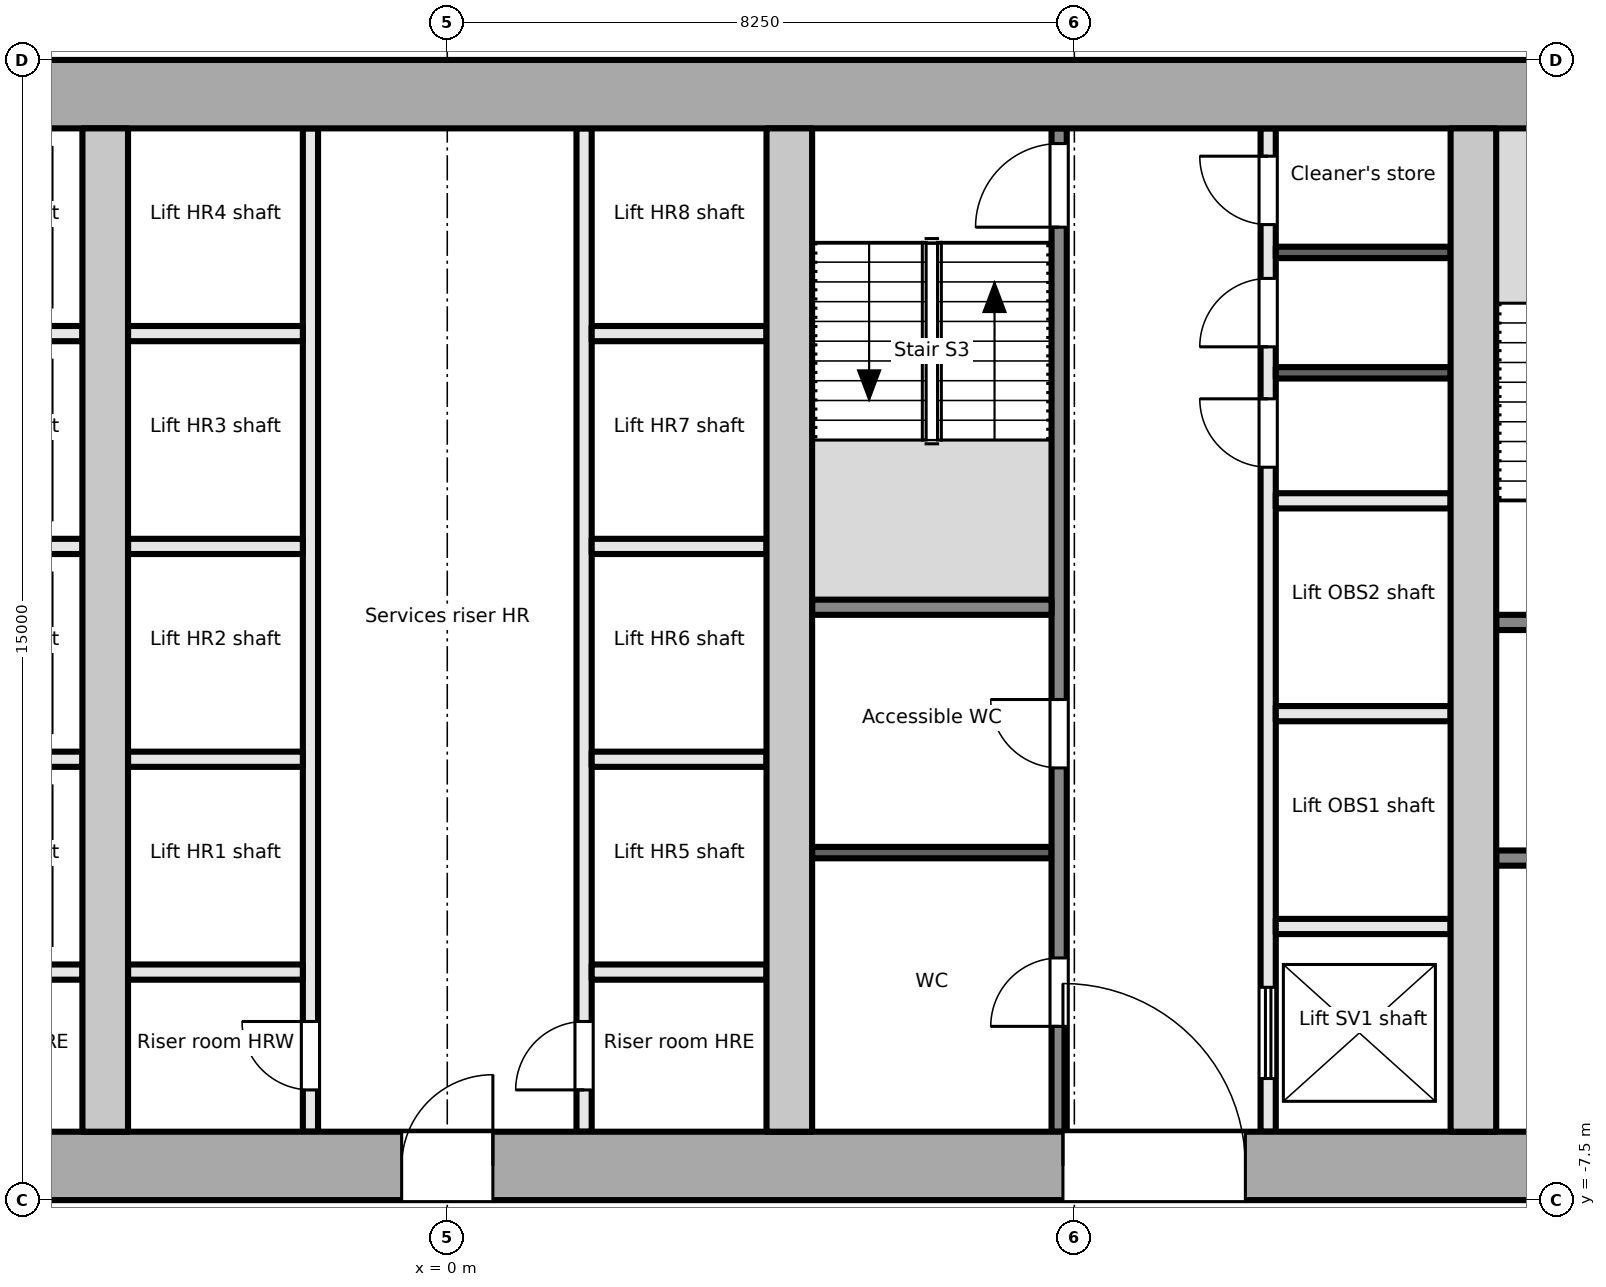
"""IFC4 building model, lengths in metres.
Left out: names, types, materials, properties, quantities, classifications, styles, units other than length and angle.
Written with IfcOpenShell. Run it as: python <this file> out.ifc"""

import sys

from ifc_helpers import new_model, si_unit, direction, frame, frame_2d, origin, place, context, subcontext, project, spatial, rectangle, extrude, element, fill, save


model = new_model("IFC4")
c1 = context("Model", 3, precision=1e-05, world=origin(), true_north=direction((0.0, 1.0)))
c2 = subcontext(c1, "Body", "Model", "MODEL_VIEW")
j1 = project(units=[si_unit("LENGTHUNIT", "METRE"), si_unit("PLANEANGLEUNIT", "RADIAN")], contexts=[c1])
p1 = place(None, origin())
s1 = spatial("IfcSite", under=j1, at=p1, CompositionType="ELEMENT")
p2 = place(p1, origin())
s2 = spatial("IfcBuilding", under=s1, at=p2, CompositionType="ELEMENT")
p3 = place(p2, frame((0.0, 0.0, 32.4)))
s3 = spatial("IfcBuildingStorey", under=s2, at=p3, CompositionType="ELEMENT", Elevation=32.4)
p4 = place(p3, frame((-18.0, -7.05, -0.2), z_axis=(0.0, 0.0, 1.0), x_axis=(1.0, 0.0, 0.0)))
e1 = element("IfcWall", 1, at=p4, inside=s3, PredefinedType="SHEAR", context=c2, shape_type="SweptSolid", body=[
    extrude(rectangle(XDim=36.0, YDim=0.9, at=frame_2d((18.0, 0.0))), origin(), (0.0, 0.0, 1.0), 4.1),
])
p5 = place(p4, frame((7.8, 0.0, 0.2)))
e2 = element("IfcOpeningElement", 2, at=p5, cuts=e1, PredefinedType="OPENING", context=c2, shape_type="SweptSolid", body=[
    extrude(rectangle(XDim=2.4, YDim=2.1, at=frame_2d((1.2, 1.05))), frame((0.0, 0.46, 0.0), z_axis=(0.0, -1.0, 0.0), x_axis=(1.0, 0.0, 0.0)), (0.0, 0.0, 1.0), 0.921),
])
p6 = place(p4, frame((17.4, 0.0, 0.2)))
e3 = element("IfcOpeningElement", 3, at=p6, cuts=e1, PredefinedType="OPENING", context=c2, shape_type="SweptSolid", body=[
    extrude(rectangle(XDim=1.2, YDim=2.1, at=frame_2d((0.6, 1.05))), frame((0.0, 0.46, 0.0), z_axis=(0.0, -1.0, 0.0), x_axis=(1.0, 0.0, 0.0)), (0.0, 0.0, 1.0), 0.921),
])
p7 = place(p4, frame((26.1, 0.0, 0.2)))
e4 = element("IfcOpeningElement", 4, at=p7, cuts=e1, PredefinedType="OPENING", context=c2, shape_type="SweptSolid", body=[
    extrude(rectangle(XDim=2.4, YDim=2.1, at=frame_2d((1.2, 1.05))), frame((0.0, 0.46, 0.0), z_axis=(0.0, -1.0, 0.0), x_axis=(1.0, 0.0, 0.0)), (0.0, 0.0, 1.0), 0.921),
])
p8 = place(p3, frame((-18.0, 7.05, -0.2), z_axis=(0.0, 0.0, 1.0), x_axis=(1.0, 0.0, 0.0)))
e5 = element("IfcWall", 5, at=p8, inside=s3, PredefinedType="SHEAR", context=c2, shape_type="SweptSolid", body=[
    extrude(rectangle(XDim=36.0, YDim=0.9, at=frame_2d((18.0, 0.0))), origin(), (0.0, 0.0, 1.0), 4.1),
])
for number, where, z_axis, x_axis in (
    (6, (-4.5, -6.6, -0.2), (0.0, 0.0, 1.0), (0.0, 1.0, 0.0)),
    (7, (4.5, -6.6, -0.2), (0.0, 0.0, 1.0), (0.0, 1.0, 0.0)),
    (8, (13.5, -6.6, -0.2), (0.0, 0.0, 1.0), (0.0, 1.0, 0.0)),
):
    element("IfcWall", number, at=place(p3, frame(where, z_axis=z_axis, x_axis=x_axis)), inside=s3, PredefinedType="SHEAR", context=c2, shape_type="SweptSolid", body=[
        extrude(rectangle(XDim=13.2, YDim=0.6, at=frame_2d((6.6, 0.0))), origin(), (0.0, 0.0, 1.0), 4.1),
    ])
p9 = place(p3, frame((13.8, -3.0, 0.0), z_axis=(0.0, 0.0, 1.0), x_axis=(1.0, 0.0, 0.0)))
e9 = element("IfcWall", 9, at=p9, inside=s3, PredefinedType="PARTITIONING", context=c2, shape_type="SweptSolid", body=[
    extrude(rectangle(XDim=3.3, YDim=0.2, at=frame_2d((1.65, 0.0))), origin(), (0.0, 0.0, 1.0), 3.9),
])
p10 = place(p9, frame((1.1, 0.0, 0.0)))
e10 = element("IfcOpeningElement", 10, at=p10, cuts=e9, PredefinedType="OPENING", context=c2, shape_type="SweptSolid", body=[
    extrude(rectangle(XDim=1.1, YDim=2.1, at=frame_2d((0.55, 1.05))), frame((0.0, 0.111, 0.0), z_axis=(0.0, -1.0, 0.0), x_axis=(1.0, 0.0, 0.0)), (0.0, 0.0, 1.0), 0.221),
])
p11 = place(p3, frame((13.8, 0.1, 0.0), z_axis=(0.0, 0.0, 1.0), x_axis=(1.0, 0.0, 0.0)))
e11 = element("IfcWall", 11, at=p11, inside=s3, PredefinedType="PARTITIONING", context=c2, shape_type="SweptSolid", body=[
    extrude(rectangle(XDim=3.3, YDim=0.2, at=frame_2d((1.65, 0.0))), origin(), (0.0, 0.0, 1.0), 3.9),
])
p12 = place(p11, frame((1.1, 0.0, 0.0)))
e12 = element("IfcOpeningElement", 12, at=p12, cuts=e11, PredefinedType="OPENING", context=c2, shape_type="SweptSolid", body=[
    extrude(rectangle(XDim=1.1, YDim=2.1, at=frame_2d((0.55, 1.05))), frame((0.0, 0.111, 0.0), z_axis=(0.0, -1.0, 0.0), x_axis=(1.0, 0.0, 0.0)), (0.0, 0.0, 1.0), 0.221),
])
for number, where, z_axis, x_axis in (
    (13, (-7.1, -1.7, 0.0), (0.0, 0.0, 1.0), (1.0, 0.0, 0.0)),
    (14, (-7.1, 1.1, 0.0), (0.0, 0.0, 1.0), (1.0, 0.0, 0.0)),
    (15, (-7.1, 3.9, 0.0), (0.0, 0.0, 1.0), (1.0, 0.0, 0.0)),
    (16, (-7.1, -4.5, 0.0), (0.0, 0.0, 1.0), (1.0, 0.0, 0.0)),
):
    element("IfcWall", number, at=place(p3, frame(where, z_axis=z_axis, x_axis=x_axis)), inside=s3, PredefinedType="PARTITIONING", context=c2, shape_type="SweptSolid", body=[
        extrude(rectangle(XDim=2.3, YDim=0.2, at=frame_2d((1.15, 0.0))), origin(), (0.0, 0.0, 1.0), 3.9),
    ])
p13 = place(p3, frame((-1.8, -6.6, 0.0), z_axis=(0.0, 0.0, 1.0), x_axis=(0.0, 1.0, 0.0)))
e17 = element("IfcWall", 17, at=p13, inside=s3, PredefinedType="PARTITIONING", context=c2, shape_type="SweptSolid", body=[
    extrude(rectangle(XDim=13.2, YDim=0.2, at=frame_2d((6.6, 0.0))), origin(), (0.0, 0.0, 1.0), 3.9),
])
p14 = place(p13, frame((0.55, 0.0, 0.0)))
e18 = element("IfcOpeningElement", 18, at=p14, cuts=e17, PredefinedType="OPENING", context=c2, shape_type="SweptSolid", body=[
    extrude(rectangle(XDim=0.9, YDim=2.1, at=frame_2d((0.45, 1.05))), frame((0.0, 0.111, 0.0), z_axis=(0.0, -1.0, 0.0), x_axis=(1.0, 0.0, 0.0)), (0.0, 0.0, 1.0), 0.221),
])
p15 = place(p3, frame((1.8, -6.6, 0.0), z_axis=(0.0, 0.0, 1.0), x_axis=(0.0, 1.0, 0.0)))
e19 = element("IfcWall", 19, at=p15, inside=s3, PredefinedType="PARTITIONING", context=c2, shape_type="SweptSolid", body=[
    extrude(rectangle(XDim=13.2, YDim=0.2, at=frame_2d((6.6, 0.0))), origin(), (0.0, 0.0, 1.0), 3.9),
])
p16 = place(p15, frame((0.55, 0.0, 0.0)))
e20 = element("IfcOpeningElement", 20, at=p16, cuts=e19, PredefinedType="OPENING", context=c2, shape_type="SweptSolid", body=[
    extrude(rectangle(XDim=0.9, YDim=2.1, at=frame_2d((0.45, 1.05))), frame((0.0, 0.111, 0.0), z_axis=(0.0, -1.0, 0.0), x_axis=(1.0, 0.0, 0.0)), (0.0, 0.0, 1.0), 0.221),
])
for number, where, z_axis, x_axis in (
    (21, (-4.2, -1.7, 0.0), (0.0, 0.0, 1.0), (1.0, 0.0, 0.0)),
    (22, (-4.2, 1.1, 0.0), (0.0, 0.0, 1.0), (1.0, 0.0, 0.0)),
    (23, (-4.2, 3.9, 0.0), (0.0, 0.0, 1.0), (1.0, 0.0, 0.0)),
    (24, (-4.2, -4.5, 0.0), (0.0, 0.0, 1.0), (1.0, 0.0, 0.0)),
    (25, (1.9, -1.7, 0.0), (0.0, 0.0, 1.0), (1.0, 0.0, 0.0)),
    (26, (1.9, 1.1, 0.0), (0.0, 0.0, 1.0), (1.0, 0.0, 0.0)),
    (27, (1.9, 3.9, 0.0), (0.0, 0.0, 1.0), (1.0, 0.0, 0.0)),
    (28, (1.9, -4.5, 0.0), (0.0, 0.0, 1.0), (1.0, 0.0, 0.0)),
):
    element("IfcWall", number, at=place(p3, frame(where, z_axis=z_axis, x_axis=x_axis)), inside=s3, PredefinedType="PARTITIONING", context=c2, shape_type="SweptSolid", body=[
        extrude(rectangle(XDim=2.3, YDim=0.2, at=frame_2d((1.15, 0.0))), origin(), (0.0, 0.0, 1.0), 3.9),
    ])
p17 = place(p3, frame((8.05, -6.6, 0.0), z_axis=(0.0, 0.0, 1.0), x_axis=(0.0, 1.0, 0.0)))
e29 = element("IfcWall", 29, at=p17, inside=s3, PredefinedType="PARTITIONING", context=c2, shape_type="SweptSolid", body=[
    extrude(rectangle(XDim=13.2, YDim=0.2, at=frame_2d((6.6, 0.0))), origin(), (0.0, 0.0, 1.0), 3.9),
])
p18 = place(p17, frame((1.386, 0.0, 0.0)))
e30 = element("IfcOpeningElement", 30, at=p18, cuts=e29, PredefinedType="OPENING", context=c2, shape_type="SweptSolid", body=[
    extrude(rectangle(XDim=0.9, YDim=2.1, at=frame_2d((0.45, 1.05))), frame((0.0, 0.111, 0.0), z_axis=(0.0, -1.0, 0.0), x_axis=(1.0, 0.0, 0.0)), (0.0, 0.0, 1.0), 0.221),
])
p19 = place(p17, frame((4.786, 0.0, 0.0)))
e31 = element("IfcOpeningElement", 31, at=p19, cuts=e29, PredefinedType="OPENING", context=c2, shape_type="SweptSolid", body=[
    extrude(rectangle(XDim=0.9, YDim=2.1, at=frame_2d((0.45, 1.05))), frame((0.0, 0.111, 0.0), z_axis=(0.0, -1.0, 0.0), x_axis=(1.0, 0.0, 0.0)), (0.0, 0.0, 1.0), 0.221),
])
p20 = place(p17, frame((11.9, 0.0, 0.0)))
e32 = element("IfcOpeningElement", 32, at=p20, cuts=e29, PredefinedType="OPENING", context=c2, shape_type="SweptSolid", body=[
    extrude(rectangle(XDim=1.1, YDim=2.1, at=frame_2d((0.55, 1.05))), frame((0.0, 0.111, 0.0), z_axis=(0.0, -1.0, 0.0), x_axis=(1.0, 0.0, 0.0)), (0.0, 0.0, 1.0), 0.221),
])
p21 = place(p3, frame((10.8, -6.6, 0.0), z_axis=(0.0, 0.0, 1.0), x_axis=(0.0, 1.0, 0.0)))
e33 = element("IfcWall", 33, at=p21, inside=s3, PredefinedType="PARTITIONING", context=c2, shape_type="SweptSolid", body=[
    extrude(rectangle(XDim=13.2, YDim=0.2, at=frame_2d((6.6, 0.0))), origin(), (0.0, 0.0, 1.0), 3.9),
])
p22 = place(p21, frame((0.7, 0.0, 0.0)))
e34 = element("IfcOpeningElement", 34, at=p22, cuts=e33, PredefinedType="OPENING", context=c2, shape_type="SweptSolid", body=[
    extrude(rectangle(XDim=1.2, YDim=2.1, at=frame_2d((0.6, 1.05))), frame((0.0, 0.111, 0.0), z_axis=(0.0, -1.0, 0.0), x_axis=(1.0, 0.0, 0.0)), (0.0, 0.0, 1.0), 0.221),
])
p23 = place(p21, frame((8.742, 0.0, 0.0)))
e35 = element("IfcOpeningElement", 35, at=p23, cuts=e33, PredefinedType="OPENING", context=c2, shape_type="SweptSolid", body=[
    extrude(rectangle(XDim=0.9, YDim=2.1, at=frame_2d((0.45, 1.05))), frame((0.0, 0.111, 0.0), z_axis=(0.0, -1.0, 0.0), x_axis=(1.0, 0.0, 0.0)), (0.0, 0.0, 1.0), 0.221),
])
p24 = place(p21, frame((10.326, 0.0, 0.0)))
e36 = element("IfcOpeningElement", 36, at=p24, cuts=e33, PredefinedType="OPENING", context=c2, shape_type="SweptSolid", body=[
    extrude(rectangle(XDim=0.9, YDim=2.1, at=frame_2d((0.45, 1.05))), frame((0.0, 0.111, 0.0), z_axis=(0.0, -1.0, 0.0), x_axis=(1.0, 0.0, 0.0)), (0.0, 0.0, 1.0), 0.221),
])
p25 = place(p21, frame((11.934, 0.0, 0.0)))
e37 = element("IfcOpeningElement", 37, at=p25, cuts=e33, PredefinedType="OPENING", context=c2, shape_type="SweptSolid", body=[
    extrude(rectangle(XDim=0.9, YDim=2.1, at=frame_2d((0.45, 1.05))), frame((0.0, 0.111, 0.0), z_axis=(0.0, -1.0, 0.0), x_axis=(1.0, 0.0, 0.0)), (0.0, 0.0, 1.0), 0.221),
])
p26 = place(p3, frame((4.8, 0.3, 0.0), z_axis=(0.0, 0.0, 1.0), x_axis=(1.0, 0.0, 0.0)))
e38 = element("IfcWall", 38, at=p26, inside=s3, PredefinedType="PARTITIONING", context=c2, shape_type="SweptSolid", body=[
    extrude(rectangle(XDim=3.15, YDim=0.2, at=frame_2d((1.575, 0.0))), origin(), (0.0, 0.0, 1.0), 3.9),
])
p27 = place(p3, frame((4.8, -2.928, 0.0), z_axis=(0.0, 0.0, 1.0), x_axis=(1.0, 0.0, 0.0)))
e39 = element("IfcWall", 39, at=p27, inside=s3, PredefinedType="PARTITIONING", context=c2, shape_type="SweptSolid", body=[
    extrude(rectangle(XDim=3.15, YDim=0.15, at=frame_2d((1.575, 0.0))), origin(), (0.0, 0.0, 1.0), 3.9),
])
for number, where, z_axis, x_axis in (
    (40, (10.9, -3.9, 0.0), (0.0, 0.0, 1.0), (1.0, 0.0, 0.0)),
    (41, (10.9, -1.1, 0.0), (0.0, 0.0, 1.0), (1.0, 0.0, 0.0)),
    (42, (10.9, 1.7, 0.0), (0.0, 0.0, 1.0), (1.0, 0.0, 0.0)),
):
    element("IfcWall", number, at=place(p3, frame(where, z_axis=z_axis, x_axis=x_axis)), inside=s3, PredefinedType="PARTITIONING", context=c2, shape_type="SweptSolid", body=[
        extrude(rectangle(XDim=2.3, YDim=0.2, at=frame_2d((1.15, 0.0))), origin(), (0.0, 0.0, 1.0), 3.9),
    ])
for number, where, z_axis, x_axis in (
    (43, (10.9, 3.384, 0.0), (0.0, 0.0, 1.0), (1.0, 0.0, 0.0)),
    (44, (10.9, 4.968, 0.0), (0.0, 0.0, 1.0), (1.0, 0.0, 0.0)),
):
    element("IfcWall", number, at=place(p3, frame(where, z_axis=z_axis, x_axis=x_axis)), inside=s3, PredefinedType="PARTITIONING", context=c2, shape_type="SweptSolid", body=[
        extrude(rectangle(XDim=2.3, YDim=0.15, at=frame_2d((1.15, 0.0))), origin(), (0.0, 0.0, 1.0), 3.9),
    ])
p28 = place(p14, origin())
e45 = element("IfcDoor", 45, at=p28, inside=s3, OperationType="SINGLE_SWING_RIGHT", PredefinedType="DOOR", context=c2, shape_type="SweptSolid", body=[
    extrude(rectangle(XDim=0.9, YDim=2.1, at=frame_2d((0.45, 1.05))), frame((0.0, 0.025, 0.0), z_axis=(0.0, -1.0, 0.0), x_axis=(1.0, 0.0, 0.0)), (0.0, 0.0, 1.0), 0.05),
])
fill(e18, e45)
p29 = place(p16, origin())
e46 = element("IfcDoor", 46, at=p29, inside=s3, OperationType="SINGLE_SWING_LEFT", PredefinedType="DOOR", context=c2, shape_type="SweptSolid", body=[
    extrude(rectangle(XDim=0.9, YDim=2.1, at=frame_2d((0.45, 1.05))), frame((0.0, 0.025, 0.0), z_axis=(0.0, -1.0, 0.0), x_axis=(1.0, 0.0, 0.0)), (0.0, 0.0, 1.0), 0.05),
])
fill(e20, e46)
p30 = place(p6, origin())
e47 = element("IfcDoor", 47, at=p30, inside=s3, OperationType="SINGLE_SWING_RIGHT", PredefinedType="DOOR", context=c2, shape_type="SweptSolid", body=[
    extrude(rectangle(XDim=1.2, YDim=2.1, at=frame_2d((0.6, 1.05))), frame((0.0, 0.025, 0.0), z_axis=(0.0, -1.0, 0.0), x_axis=(1.0, 0.0, 0.0)), (0.0, 0.0, 1.0), 0.05),
])
fill(e3, e47)
p31 = place(p18, origin())
e48 = element("IfcDoor", 48, at=p31, inside=s3, OperationType="SINGLE_SWING_LEFT", PredefinedType="DOOR", context=c2, shape_type="SweptSolid", body=[
    extrude(rectangle(XDim=0.9, YDim=2.1, at=frame_2d((0.45, 1.05))), frame((0.0, 0.025, 0.0), z_axis=(0.0, -1.0, 0.0), x_axis=(1.0, 0.0, 0.0)), (0.0, 0.0, 1.0), 0.05),
])
fill(e30, e48)
p32 = place(p19, origin())
e49 = element("IfcDoor", 49, at=p32, inside=s3, OperationType="SINGLE_SWING_RIGHT", PredefinedType="DOOR", context=c2, shape_type="SweptSolid", body=[
    extrude(rectangle(XDim=0.9, YDim=2.1, at=frame_2d((0.45, 1.05))), frame((0.0, 0.025, 0.0), z_axis=(0.0, -1.0, 0.0), x_axis=(1.0, 0.0, 0.0)), (0.0, 0.0, 1.0), 0.05),
])
fill(e31, e49)
p33 = place(p20, origin())
e50 = element("IfcDoor", 50, at=p33, inside=s3, OperationType="SINGLE_SWING_LEFT", PredefinedType="DOOR", context=c2, shape_type="SweptSolid", body=[
    extrude(rectangle(XDim=1.1, YDim=2.1, at=frame_2d((0.55, 1.05))), frame((0.0, 0.025, 0.0), z_axis=(0.0, -1.0, 0.0), x_axis=(1.0, 0.0, 0.0)), (0.0, 0.0, 1.0), 0.05),
])
fill(e32, e50)
p34 = place(p7, origin())
e51 = element("IfcDoor", 51, at=p34, inside=s3, OperationType="DOUBLE_DOOR_DOUBLE_SWING", PredefinedType="DOOR", context=c2, shape_type="SweptSolid", body=[
    extrude(rectangle(XDim=2.4, YDim=2.1, at=frame_2d((1.2, 1.05))), frame((0.0, 0.025, 0.0), z_axis=(0.0, -1.0, 0.0), x_axis=(1.0, 0.0, 0.0)), (0.0, 0.0, 1.0), 0.05),
])
fill(e4, e51)
p35 = place(p22, origin())
e52 = element("IfcDoor", 52, at=p35, inside=s3, OperationType="DOUBLE_DOOR_SLIDING", PredefinedType="DOOR", context=c2, shape_type="SweptSolid", body=[
    extrude(rectangle(XDim=1.2, YDim=2.1, at=frame_2d((0.6, 1.05))), frame((0.0, 0.025, 0.0), z_axis=(0.0, -1.0, 0.0), x_axis=(1.0, 0.0, 0.0)), (0.0, 0.0, 1.0), 0.05),
])
fill(e34, e52)
p36 = place(p23, origin())
e53 = element("IfcDoor", 53, at=p36, inside=s3, OperationType="SINGLE_SWING_RIGHT", PredefinedType="DOOR", context=c2, shape_type="SweptSolid", body=[
    extrude(rectangle(XDim=0.9, YDim=2.1, at=frame_2d((0.45, 1.05))), frame((0.0, 0.025, 0.0), z_axis=(0.0, -1.0, 0.0), x_axis=(1.0, 0.0, 0.0)), (0.0, 0.0, 1.0), 0.05),
])
fill(e35, e53)
p37 = place(p24, origin())
e54 = element("IfcDoor", 54, at=p37, inside=s3, OperationType="SINGLE_SWING_LEFT", PredefinedType="DOOR", context=c2, shape_type="SweptSolid", body=[
    extrude(rectangle(XDim=0.9, YDim=2.1, at=frame_2d((0.45, 1.05))), frame((0.0, 0.025, 0.0), z_axis=(0.0, -1.0, 0.0), x_axis=(1.0, 0.0, 0.0)), (0.0, 0.0, 1.0), 0.05),
])
fill(e36, e54)
p38 = place(p25, origin())
e55 = element("IfcDoor", 55, at=p38, inside=s3, OperationType="SINGLE_SWING_RIGHT", PredefinedType="DOOR", context=c2, shape_type="SweptSolid", body=[
    extrude(rectangle(XDim=0.9, YDim=2.1, at=frame_2d((0.45, 1.05))), frame((0.0, 0.025, 0.0), z_axis=(0.0, -1.0, 0.0), x_axis=(1.0, 0.0, 0.0)), (0.0, 0.0, 1.0), 0.05),
])
fill(e37, e55)
save(model, sys.argv[1])
